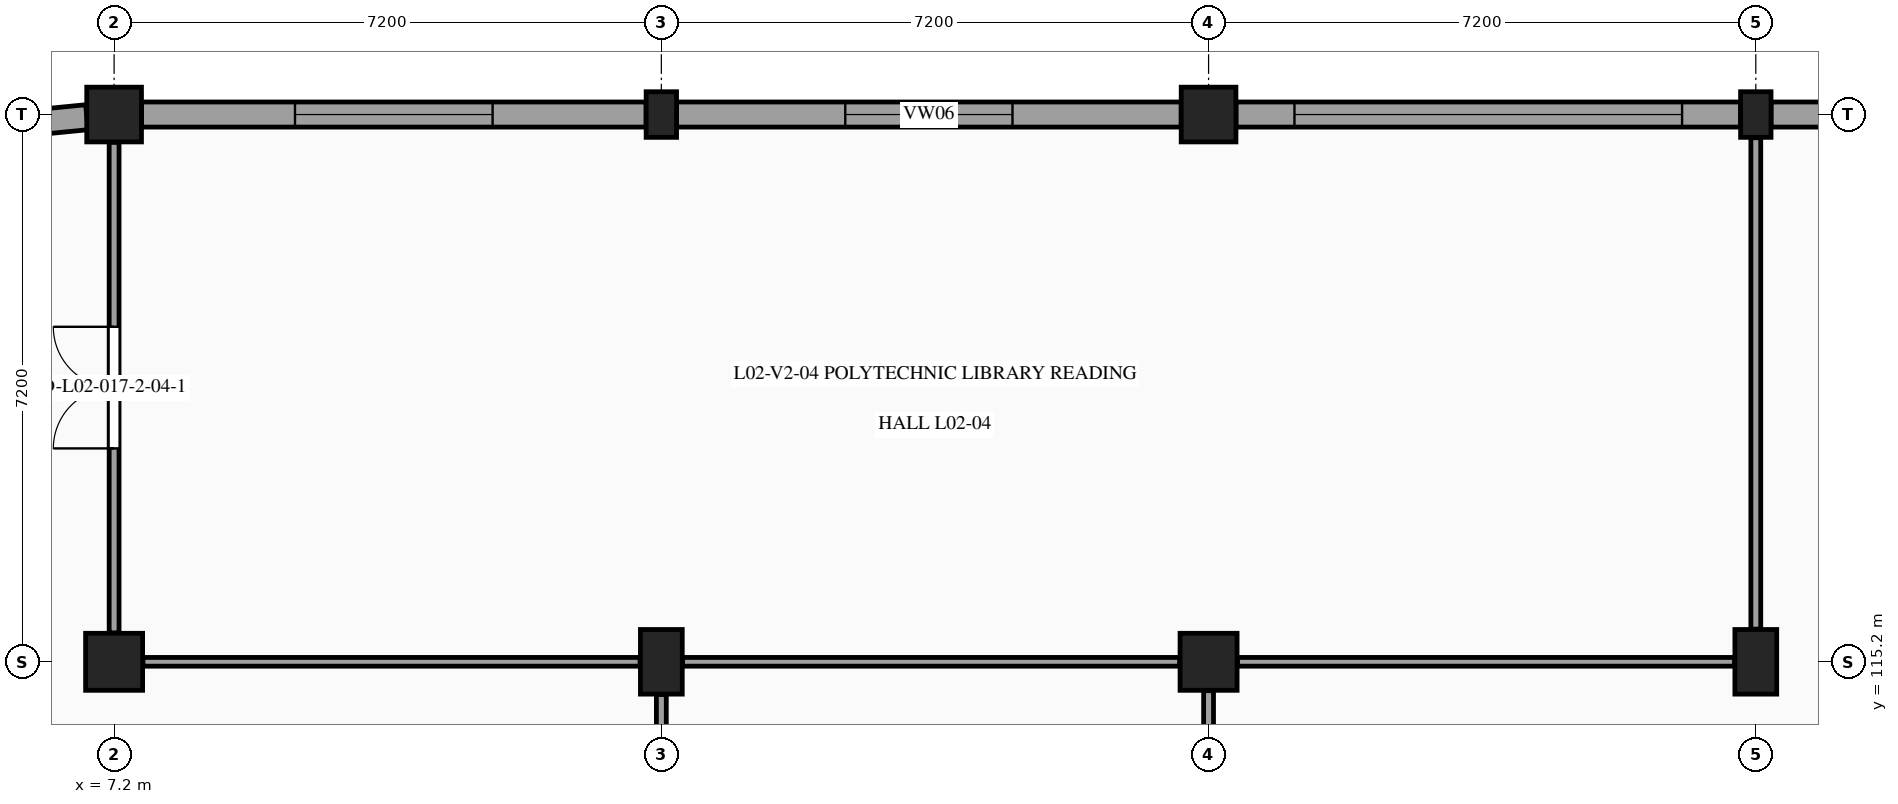
"""IFC4 building model, lengths in metres.
Left out: names, types, materials, properties, quantities, classifications, styles, units other than length and angle.
Written with IfcOpenShell. Run it as: python <this file> out.ifc"""

import sys

from ifc_helpers import new_model, si_unit, direction, frame, frame_2d, origin, origin_2d, place, context, subcontext, project, spatial, rectangle, extrude, element, fill, save


model = new_model("IFC4")
c1 = context("Model", 3, precision=1e-05, world=origin(), true_north=direction((0.0, 1.0)))
c2 = subcontext(c1, "Body", "Model", "MODEL_VIEW")
j1 = project(units=[si_unit("LENGTHUNIT", "METRE"), si_unit("PLANEANGLEUNIT", "RADIAN")], contexts=[c1])
p1 = place(None, origin())
s1 = spatial("IfcSite", under=j1, at=p1, CompositionType="ELEMENT")
p2 = place(p1, origin())
s2 = spatial("IfcBuilding", under=s1, at=p2, CompositionType="ELEMENT")
p3 = place(p2, frame((0.0, 0.0, 9.9)))
s3 = spatial("IfcBuildingStorey", under=s2, at=p3, CompositionType="ELEMENT", Elevation=9.9)
p4 = place(p3, frame((7.2, 115.2, 0.0), z_axis=(0.0, 0.0, 1.0), x_axis=(1.0, 0.0, 0.0)))
e1 = element("IfcColumn", 1, at=p4, inside=s3, PredefinedType="COLUMN", context=c2, shape_type="SweptSolid", body=[
    extrude(rectangle(XDim=0.75, YDim=0.75, at=origin_2d()), origin(), (0.0, 0.0, 1.0), 4.5),
])
p5 = place(p3, frame((7.2, 122.4, 0.0), z_axis=(0.0, 0.0, 1.0), x_axis=(1.0, 0.0, 0.0)))
e2 = element("IfcColumn", 2, at=p5, inside=s3, PredefinedType="COLUMN", context=c2, shape_type="SweptSolid", body=[
    extrude(rectangle(XDim=0.72, YDim=0.72, at=origin_2d()), origin(), (0.0, 0.0, 1.0), 4.5),
])
p6 = place(p3, frame((14.4, 115.2, 0.0), z_axis=(0.0, 0.0, 1.0), x_axis=(1.0, 0.0, 0.0)))
e3 = element("IfcColumn", 3, at=p6, inside=s3, PredefinedType="COLUMN", context=c2, shape_type="SweptSolid", body=[
    extrude(rectangle(XDim=0.55, YDim=0.85, at=origin_2d()), origin(), (0.0, 0.0, 1.0), 4.5),
])
p7 = place(p3, frame((14.4, 122.4, 0.0), z_axis=(0.0, 0.0, 1.0), x_axis=(1.0, 0.0, 0.0)))
e4 = element("IfcColumn", 4, at=p7, inside=s3, PredefinedType="PILASTER", context=c2, shape_type="SweptSolid", body=[
    extrude(rectangle(XDim=0.4, YDim=0.6, at=origin_2d()), origin(), (0.0, 0.0, 1.0), 4.5),
])
p8 = place(p3, frame((21.6, 115.2, 0.0), z_axis=(0.0, 0.0, 1.0), x_axis=(1.0, 0.0, 0.0)))
e5 = element("IfcColumn", 5, at=p8, inside=s3, PredefinedType="COLUMN", context=c2, shape_type="SweptSolid", body=[
    extrude(rectangle(XDim=0.75, YDim=0.75, at=origin_2d()), origin(), (0.0, 0.0, 1.0), 4.5),
])
p9 = place(p3, frame((21.6, 122.4, 0.0), z_axis=(0.0, 0.0, 1.0), x_axis=(1.0, 0.0, 0.0)))
e6 = element("IfcColumn", 6, at=p9, inside=s3, PredefinedType="COLUMN", context=c2, shape_type="SweptSolid", body=[
    extrude(rectangle(XDim=0.72, YDim=0.72, at=origin_2d()), origin(), (0.0, 0.0, 1.0), 4.5),
])
p10 = place(p3, frame((28.8, 115.2, 0.0), z_axis=(0.0, 0.0, 1.0), x_axis=(1.0, 0.0, 0.0)))
e7 = element("IfcColumn", 7, at=p10, inside=s3, PredefinedType="COLUMN", context=c2, shape_type="SweptSolid", body=[
    extrude(rectangle(XDim=0.55, YDim=0.85, at=origin_2d()), origin(), (0.0, 0.0, 1.0), 4.5),
])
p11 = place(p3, frame((28.8, 122.4, 0.0), z_axis=(0.0, 0.0, 1.0), x_axis=(1.0, 0.0, 0.0)))
e8 = element("IfcColumn", 8, at=p11, inside=s3, PredefinedType="PILASTER", context=c2, shape_type="SweptSolid", body=[
    extrude(rectangle(XDim=0.4, YDim=0.6, at=origin_2d()), origin(), (0.0, 0.0, 1.0), 4.5),
])
p12 = place(p3, frame((5.795, 122.262, 0.0), z_axis=(0.0, 0.0, 1.0), x_axis=(0.995187764733, 0.097986289481, 0.0)))
e9 = element("IfcWall", 9, at=p12, inside=s3, PredefinedType="STANDARD", context=c2, shape_type="SweptSolid", body=[
    extrude(rectangle(XDim=1.052, YDim=0.33, at=frame_2d((0.526, 0.0))), origin(), (0.0, 0.0, 1.0), 4.225),
])
p13 = place(p3, frame((7.56, 122.4, 0.0), z_axis=(0.0, 0.0, 1.0), x_axis=(1.0, 0.0, 0.0)))
e10 = element("IfcWall", 10, at=p13, inside=s3, PredefinedType="STANDARD", context=c2, shape_type="SweptSolid", body=[
    extrude(rectangle(XDim=6.64, YDim=0.33, at=frame_2d((3.32, 0.0))), origin(), (0.0, 0.0, 1.0), 3.47),
])
p14 = place(p13, frame((2.02, 0.0, 0.98)))
e11 = element("IfcOpeningElement", 11, at=p14, cuts=e10, PredefinedType="OPENING", context=c2, shape_type="SweptSolid", body=[
    extrude(rectangle(XDim=2.6, YDim=1.5, at=frame_2d((1.3, 0.75))), frame((0.0, 0.175, 0.0), z_axis=(0.0, -1.0, 0.0), x_axis=(1.0, 0.0, 0.0)), (0.0, 0.0, 1.0), 0.35),
])
p15 = place(p3, frame((14.6, 122.4, 0.0), z_axis=(0.0, 0.0, 1.0), x_axis=(1.0, 0.0, 0.0)))
e12 = element("IfcWall", 12, at=p15, inside=s3, PredefinedType="STANDARD", context=c2, shape_type="SweptSolid", body=[
    extrude(rectangle(XDim=6.64, YDim=0.33, at=frame_2d((3.32, 0.0))), origin(), (0.0, 0.0, 1.0), 3.47),
])
p16 = place(p15, frame((2.22, 0.0, 0.98)))
e13 = element("IfcOpeningElement", 13, at=p16, cuts=e12, PredefinedType="OPENING", context=c2, shape_type="SweptSolid", body=[
    extrude(rectangle(XDim=2.2, YDim=1.45, at=frame_2d((1.1, 0.725))), frame((0.0, 0.175, 0.0), z_axis=(0.0, -1.0, 0.0), x_axis=(1.0, 0.0, 0.0)), (0.0, 0.0, 1.0), 0.35),
])
p17 = place(p3, frame((21.96, 122.4, 0.0), z_axis=(0.0, 0.0, 1.0), x_axis=(1.0, 0.0, 0.0)))
e14 = element("IfcWall", 14, at=p17, inside=s3, PredefinedType="STANDARD", context=c2, shape_type="SweptSolid", body=[
    extrude(rectangle(XDim=6.64, YDim=0.33, at=frame_2d((3.32, 0.0))), origin(), (0.0, 0.0, 1.0), 3.47),
])
p18 = place(p17, frame((0.77, 0.0, 0.98)))
e15 = element("IfcOpeningElement", 15, at=p18, cuts=e14, PredefinedType="OPENING", context=c2, shape_type="SweptSolid", body=[
    extrude(rectangle(XDim=5.1, YDim=1.75, at=frame_2d((2.55, 0.875))), frame((0.0, 0.175, 0.0), z_axis=(0.0, -1.0, 0.0), x_axis=(1.0, 0.0, 0.0)), (0.0, 0.0, 1.0), 0.35),
])
p19 = place(p3, frame((29.0, 122.4, 0.0), z_axis=(0.0, 0.0, 1.0), x_axis=(1.0, 0.0, 0.0)))
e16 = element("IfcWall", 16, at=p19, inside=s3, PredefinedType="STANDARD", context=c2, shape_type="SweptSolid", body=[
    extrude(rectangle(XDim=6.64, YDim=0.33, at=frame_2d((3.32, 0.0))), origin(), (0.0, 0.0, 1.0), 3.47),
])
p20 = place(p19, frame((1.12, 0.0, 0.98)))
e17 = element("IfcOpeningElement", 17, at=p20, cuts=e16, PredefinedType="OPENING", context=c2, shape_type="SweptSolid", body=[
    extrude(rectangle(XDim=4.4, YDim=1.65, at=frame_2d((2.2, 0.825))), frame((0.0, 0.175, 0.0), z_axis=(0.0, -1.0, 0.0), x_axis=(1.0, 0.0, 0.0)), (0.0, 0.0, 1.0), 0.35),
])
p21 = place(p3, frame((7.2, 115.58, 0.0), z_axis=(0.0, 0.0, 1.0), x_axis=(0.0, 1.0, 0.0)))
e18 = element("IfcWall", 18, at=p21, inside=s3, PredefinedType="PARTITIONING", context=c2, shape_type="SweptSolid", body=[
    extrude(rectangle(XDim=6.455, YDim=0.13, at=frame_2d((3.228, 0.0))), origin(), (0.0, 0.0, 1.0), 3.53),
])
p22 = place(p21, frame((2.427, 0.0, 0.0)))
e19 = element("IfcOpeningElement", 19, at=p22, cuts=e18, PredefinedType="OPENING", context=c2, shape_type="SweptSolid", body=[
    extrude(rectangle(XDim=1.6, YDim=2.2, at=frame_2d((0.8, 1.1))), frame((0.0, 0.075, 0.0), z_axis=(0.0, -1.0, 0.0), x_axis=(1.0, 0.0, 0.0)), (0.0, 0.0, 1.0), 0.15),
])
p23 = place(p3, frame((14.4, 108.355, 0.0), z_axis=(0.0, 0.0, 1.0), x_axis=(0.0, 1.0, 0.0)))
e20 = element("IfcWall", 20, at=p23, inside=s3, PredefinedType="PARTITIONING", context=c2, shape_type="SweptSolid", body=[
    extrude(rectangle(XDim=6.415, YDim=0.13, at=frame_2d((3.208, 0.0))), origin(), (0.0, 0.0, 1.0), 3.535),
])
p24 = place(p3, frame((7.58, 115.2, 0.0), z_axis=(0.0, 0.0, 1.0), x_axis=(1.0, 0.0, 0.0)))
e21 = element("IfcWall", 21, at=p24, inside=s3, PredefinedType="PARTITIONING", context=c2, shape_type="SweptSolid", body=[
    extrude(rectangle(XDim=6.54, YDim=0.115, at=frame_2d((3.27, 0.0))), origin(), (0.0, 0.0, 1.0), 3.5),
])
p25 = place(p3, frame((21.6, 108.395, 0.0), z_axis=(0.0, 0.0, 1.0), x_axis=(0.0, 1.0, 0.0)))
e22 = element("IfcWall", 22, at=p25, inside=s3, PredefinedType="PARTITIONING", context=c2, shape_type="SweptSolid", body=[
    extrude(rectangle(XDim=6.425, YDim=0.13, at=frame_2d((3.212, 0.0))), origin(), (0.0, 0.0, 1.0), 3.535),
])
p26 = place(p25, frame((2.413, 0.0, 0.0)))
e23 = element("IfcOpeningElement", 23, at=p26, cuts=e22, PredefinedType="OPENING", context=c2, shape_type="SweptSolid", body=[
    extrude(rectangle(XDim=1.6, YDim=2.2, at=frame_2d((0.8, 1.1))), frame((0.0, 0.075, 0.0), z_axis=(0.0, -1.0, 0.0), x_axis=(1.0, 0.0, 0.0)), (0.0, 0.0, 1.0), 0.15),
])
p27 = place(p3, frame((14.68, 115.2, 0.0), z_axis=(0.0, 0.0, 1.0), x_axis=(1.0, 0.0, 0.0)))
e24 = element("IfcWall", 24, at=p27, inside=s3, PredefinedType="PARTITIONING", context=c2, shape_type="SweptSolid", body=[
    extrude(rectangle(XDim=6.54, YDim=0.115, at=frame_2d((3.27, 0.0))), origin(), (0.0, 0.0, 1.0), 3.505),
])
p28 = place(p3, frame((21.98, 115.2, 0.0), z_axis=(0.0, 0.0, 1.0), x_axis=(1.0, 0.0, 0.0)))
e25 = element("IfcWall", 25, at=p28, inside=s3, PredefinedType="PARTITIONING", context=c2, shape_type="SweptSolid", body=[
    extrude(rectangle(XDim=6.54, YDim=0.115, at=frame_2d((3.27, 0.0))), origin(), (0.0, 0.0, 1.0), 3.525),
])
p29 = place(p3, frame((28.8, 115.63, 0.0), z_axis=(0.0, 0.0, 1.0), x_axis=(0.0, 1.0, 0.0)))
e26 = element("IfcWall", 26, at=p29, inside=s3, PredefinedType="PARTITIONING", context=c2, shape_type="SweptSolid", body=[
    extrude(rectangle(XDim=6.465, YDim=0.13, at=frame_2d((3.232, 0.0))), origin(), (0.0, 0.0, 1.0), 3.53),
])
p30 = place(p14, origin())
e27 = element("IfcWindow", 27, at=p30, inside=s3, PartitioningType="SINGLE_PANEL", PredefinedType="WINDOW", context=c2, shape_type="SweptSolid", body=[
    extrude(rectangle(XDim=2.6, YDim=1.5, at=frame_2d((1.3, 0.75))), frame((0.0, -0.03, 0.0), z_axis=(0.0, -1.0, 0.0), x_axis=(1.0, 0.0, 0.0)), (0.0, 0.0, 1.0), 0.06),
])
fill(e11, e27)
p31 = place(p16, origin())
e28 = element("IfcWindow", 28, at=p31, inside=s3, PartitioningType="SINGLE_PANEL", PredefinedType="WINDOW", context=c2, shape_type="SweptSolid", body=[
    extrude(rectangle(XDim=2.2, YDim=1.45, at=frame_2d((1.1, 0.725))), frame((0.0, -0.03, 0.0), z_axis=(0.0, -1.0, 0.0), x_axis=(1.0, 0.0, 0.0)), (0.0, 0.0, 1.0), 0.06),
])
fill(e13, e28)
p32 = place(p18, origin())
e29 = element("IfcWindow", 29, at=p32, inside=s3, PartitioningType="SINGLE_PANEL", PredefinedType="WINDOW", context=c2, shape_type="SweptSolid", body=[
    extrude(rectangle(XDim=5.1, YDim=1.75, at=frame_2d((2.55, 0.875))), frame((0.0, -0.03, 0.0), z_axis=(0.0, -1.0, 0.0), x_axis=(1.0, 0.0, 0.0)), (0.0, 0.0, 1.0), 0.06),
])
fill(e15, e29)
p33 = place(p22, origin())
e30 = element("IfcDoor", 30, at=p33, inside=s3, OperationType="DOUBLE_DOOR_SINGLE_SWING", PredefinedType="DOOR", context=c2, shape_type="SweptSolid", body=[
    extrude(rectangle(XDim=1.6, YDim=2.2, at=frame_2d((0.8, 1.1))), frame((0.0, 0.025, 0.0), z_axis=(0.0, -1.0, 0.0), x_axis=(1.0, 0.0, 0.0)), (0.0, 0.0, 1.0), 0.05),
])
fill(e19, e30)
save(model, sys.argv[1])
